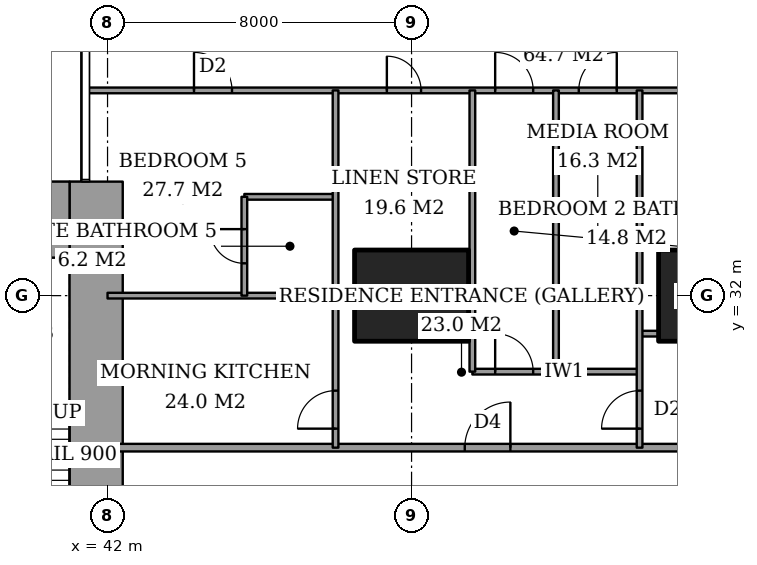
"""IFC4 building model, lengths in metres.
Left out: names, types, materials, properties, quantities, classifications, styles, units other than length and angle.
Written with IfcOpenShell. Run it as: python <this file> out.ifc"""

import sys

from ifc_helpers import new_model, si_unit, direction, frame, frame_2d, origin, origin_2d, place, context, subcontext, project, spatial, rectangle, extrude, element, fill, save


model = new_model("IFC4")
c1 = context("Model", 3, precision=1e-05, world=origin(), true_north=direction((0.0, 1.0)))
c2 = subcontext(c1, "Body", "Model", "MODEL_VIEW")
j1 = project(units=[si_unit("LENGTHUNIT", "METRE"), si_unit("PLANEANGLEUNIT", "RADIAN")], contexts=[c1])
p1 = place(None, origin())
s1 = spatial("IfcSite", under=j1, at=p1, CompositionType="ELEMENT")
p2 = place(p1, origin())
s2 = spatial("IfcBuilding", under=s1, at=p2, CompositionType="ELEMENT")
p3 = place(p2, frame((0.0, 0.0, 237.6)))
s3 = spatial("IfcBuildingStorey", under=s2, at=p3, CompositionType="ELEMENT", Elevation=237.6)
for number, where, z_axis, x_axis in (
    (1, (50.0, 32.0, 0.0), (0.0, 0.0, 1.0), (1.0, 0.0, 0.0)),
    (2, (58.0, 32.0, 0.0), (0.0, 0.0, 1.0), (1.0, 0.0, 0.0)),
):
    element("IfcColumn", number, at=place(p3, frame(where, z_axis=z_axis, x_axis=x_axis)), inside=s3, PredefinedType="COLUMN", context=c2, shape_type="SweptSolid", body=[
        extrude(rectangle(XDim=3.0, YDim=2.4, at=origin_2d()), origin(), (0.0, 0.0, 1.0), 3.6),
    ])
p4 = place(p3, frame((37.85, 34.0, 0.0), z_axis=(0.0, 0.0, 1.0), x_axis=(1.0, 0.0, 0.0)))
e3 = element("IfcWall", 3, at=p4, inside=s3, PredefinedType="SHEAR", context=c2, shape_type="SweptSolid", body=[
    extrude(rectangle(XDim=3.15, YDim=2.0, at=frame_2d((1.575, 0.0))), origin(), (0.0, 0.0, 1.0), 3.6),
])
p5 = place(p3, frame((41.7, 24.85, 0.0), z_axis=(0.0, 0.0, 1.0), x_axis=(0.0, 1.0, 0.0)))
e4 = element("IfcWall", 4, at=p5, inside=s3, PredefinedType="SHEAR", context=c2, shape_type="SweptSolid", body=[
    extrude(rectangle(XDim=10.15, YDim=1.4, at=frame_2d((5.075, 0.0))), origin(), (0.0, 0.0, 1.0), 3.6),
])
p6 = place(p3, frame((42.0, 28.0, 0.0), z_axis=(0.0, 0.0, 1.0), x_axis=(1.0, 0.0, 0.0)))
e5 = element("IfcWall", 5, at=p6, inside=s3, PredefinedType="PARTITIONING", context=c2, shape_type="SweptSolid", body=[
    extrude(rectangle(XDim=17.275, YDim=0.2, at=frame_2d((8.637, 0.0))), origin(), (0.0, 0.0, 1.0), 3.35),
])
p7 = place(p6, frame((9.4, 0.0, 0.0)))
e6 = element("IfcOpeningElement", 6, at=p7, cuts=e5, PredefinedType="OPENING", context=c2, shape_type="SweptSolid", body=[
    extrude(rectangle(XDim=1.2, YDim=2.4, at=frame_2d((0.6, 1.2))), frame((0.0, 0.11, 0.0), z_axis=(0.0, -1.0, 0.0), x_axis=(1.0, 0.0, 0.0)), (0.0, 0.0, 1.0), 0.22),
])
p8 = place(p3, frame((51.6, 30.0, 0.0), z_axis=(0.0, 0.0, 1.0), x_axis=(1.0, 0.0, 0.0)))
e7 = element("IfcWall", 7, at=p8, inside=s3, PredefinedType="PARTITIONING", context=c2, shape_type="SweptSolid", body=[
    extrude(rectangle(XDim=4.4, YDim=0.15, at=frame_2d((2.2, 0.0))), origin(), (0.0, 0.0, 1.0), 3.35),
])
p9 = place(p8, frame((0.6, 0.0, 0.0)))
e8 = element("IfcOpeningElement", 8, at=p9, cuts=e7, PredefinedType="OPENING", context=c2, shape_type="SweptSolid", body=[
    extrude(rectangle(XDim=1.0, YDim=2.1, at=frame_2d((0.5, 1.05))), frame((0.0, 0.085, 0.0), z_axis=(0.0, -1.0, 0.0), x_axis=(1.0, 0.0, 0.0)), (0.0, 0.0, 1.0), 0.17),
])
p10 = place(p3, frame((56.0, 31.0, 0.0), z_axis=(0.0, 0.0, 1.0), x_axis=(1.0, 0.0, 0.0)))
e9 = element("IfcWall", 9, at=p10, inside=s3, PredefinedType="PARTITIONING", context=c2, shape_type="SweptSolid", body=[
    extrude(rectangle(XDim=0.5, YDim=0.15, at=frame_2d((0.25, 0.0))), origin(), (0.0, 0.0, 1.0), 3.35),
])
p11 = place(p3, frame((48.0, 31.95, 0.0), z_axis=(0.0, 0.0, 1.0), x_axis=(1.0, 0.0, 0.0)))
e10 = element("IfcWall", 10, at=p11, inside=s3, PredefinedType="PARTITIONING", context=c2, shape_type="SweptSolid", body=[
    extrude(rectangle(XDim=0.5, YDim=0.15, at=frame_2d((0.25, 0.0))), origin(), (0.0, 0.0, 1.0), 2.634),
])
p12 = place(p3, frame((42.0, 32.0, 0.0), z_axis=(0.0, 0.0, 1.0), x_axis=(1.0, 0.0, 0.0)))
e11 = element("IfcWall", 11, at=p12, inside=s3, PredefinedType="PARTITIONING", context=c2, shape_type="SweptSolid", body=[
    extrude(rectangle(XDim=6.0, YDim=0.15, at=frame_2d((3.0, 0.0))), origin(), (0.0, 0.0, 1.0), 2.634),
])
p13 = place(p3, frame((45.6, 34.6, 0.0), z_axis=(0.0, 0.0, 1.0), x_axis=(1.0, 0.0, 0.0)))
e12 = element("IfcWall", 12, at=p13, inside=s3, PredefinedType="PARTITIONING", context=c2, shape_type="SweptSolid", body=[
    extrude(rectangle(XDim=2.4, YDim=0.15, at=frame_2d((1.2, 0.0))), origin(), (0.0, 0.0, 1.0), 3.35),
])
p14 = place(p3, frame((41.439, 37.4, 0.0), z_axis=(0.0, 0.0, 1.0), x_axis=(1.0, 0.0, 0.0)))
e13 = element("IfcWall", 13, at=p14, inside=s3, PredefinedType="PARTITIONING", context=c2, shape_type="SweptSolid", body=[
    extrude(rectangle(XDim=25.011, YDim=0.15, at=frame_2d((12.505, 0.0))), origin(), (0.0, 0.0, 1.0), 3.35),
])
p15 = place(p14, frame((10.761, 0.0, 0.0)))
e14 = element("IfcOpeningElement", 14, at=p15, cuts=e13, PredefinedType="OPENING", context=c2, shape_type="SweptSolid", body=[
    extrude(rectangle(XDim=1.0, YDim=2.1, at=frame_2d((0.5, 1.05))), frame((0.0, 0.085, 0.0), z_axis=(0.0, -1.0, 0.0), x_axis=(1.0, 0.0, 0.0)), (0.0, 0.0, 1.0), 0.17),
])
p16 = place(p14, frame((20.924, 0.0, 0.0)))
e15 = element("IfcOpeningElement", 15, at=p16, cuts=e13, PredefinedType="OPENING", context=c2, shape_type="SweptSolid", body=[
    extrude(rectangle(XDim=1.0, YDim=2.1, at=frame_2d((0.5, 1.05))), frame((0.0, 0.085, 0.0), z_axis=(0.0, -1.0, 0.0), x_axis=(1.0, 0.0, 0.0)), (0.0, 0.0, 1.0), 0.17),
])
p17 = place(p14, frame((15.749, 0.0, 0.0)))
e16 = element("IfcOpeningElement", 16, at=p17, cuts=e13, PredefinedType="OPENING", context=c2, shape_type="SweptSolid", body=[
    extrude(rectangle(XDim=0.9, YDim=2.1, at=frame_2d((0.45, 1.05))), frame((0.0, 0.085, 0.0), z_axis=(0.0, -1.0, 0.0), x_axis=(1.0, 0.0, 0.0)), (0.0, 0.0, 1.0), 0.17),
])
p18 = place(p14, frame((12.961, 0.0, 0.0)))
e17 = element("IfcOpeningElement", 17, at=p18, cuts=e13, PredefinedType="OPENING", context=c2, shape_type="SweptSolid", body=[
    extrude(rectangle(XDim=1.0, YDim=2.1, at=frame_2d((0.5, 1.05))), frame((0.0, 0.085, 0.0), z_axis=(0.0, -1.0, 0.0), x_axis=(1.0, 0.0, 0.0)), (0.0, 0.0, 1.0), 0.17),
])
p19 = place(p14, frame((7.911, 0.0, 0.0)))
e18 = element("IfcOpeningElement", 18, at=p19, cuts=e13, PredefinedType="OPENING", context=c2, shape_type="SweptSolid", body=[
    extrude(rectangle(XDim=0.9, YDim=2.1, at=frame_2d((0.45, 1.05))), frame((0.0, 0.085, 0.0), z_axis=(0.0, -1.0, 0.0), x_axis=(1.0, 0.0, 0.0)), (0.0, 0.0, 1.0), 0.17),
])
p20 = place(p14, frame((2.836, 0.0, 0.0)))
e19 = element("IfcOpeningElement", 19, at=p20, cuts=e13, PredefinedType="OPENING", context=c2, shape_type="SweptSolid", body=[
    extrude(rectangle(XDim=1.0, YDim=2.1, at=frame_2d((0.5, 1.05))), frame((0.0, 0.085, 0.0), z_axis=(0.0, -1.0, 0.0), x_axis=(1.0, 0.0, 0.0)), (0.0, 0.0, 1.0), 0.17),
])
p21 = place(p3, frame((45.6, 32.0, 0.0), z_axis=(0.0, 0.0, 1.0), x_axis=(0.0, 1.0, 0.0)))
e20 = element("IfcWall", 20, at=p21, inside=s3, PredefinedType="PARTITIONING", context=c2, shape_type="SweptSolid", body=[
    extrude(rectangle(XDim=2.6, YDim=0.15, at=frame_2d((1.3, 0.0))), origin(), (0.0, 0.0, 1.0), 3.35),
])
p22 = place(p21, frame((0.85, 0.0, 0.0)))
e21 = element("IfcOpeningElement", 21, at=p22, cuts=e20, PredefinedType="OPENING", context=c2, shape_type="SweptSolid", body=[
    extrude(rectangle(XDim=0.9, YDim=2.1, at=frame_2d((0.45, 1.05))), frame((0.0, 0.085, 0.0), z_axis=(0.0, -1.0, 0.0), x_axis=(1.0, 0.0, 0.0)), (0.0, 0.0, 1.0), 0.17),
])
p23 = place(p3, frame((48.0, 28.0, 0.0), z_axis=(0.0, 0.0, 1.0), x_axis=(0.0, 1.0, 0.0)))
e22 = element("IfcWall", 22, at=p23, inside=s3, PredefinedType="PARTITIONING", context=c2, shape_type="SweptSolid", body=[
    extrude(rectangle(XDim=9.4, YDim=0.15, at=frame_2d((4.7, 0.0))), origin(), (0.0, 0.0, 1.0), 3.35),
])
p24 = place(p23, frame((0.5, 0.0, 0.0)))
e23 = element("IfcOpeningElement", 23, at=p24, cuts=e22, PredefinedType="OPENING", context=c2, shape_type="SweptSolid", body=[
    extrude(rectangle(XDim=1.0, YDim=2.1, at=frame_2d((0.5, 1.05))), frame((0.0, 0.085, 0.0), z_axis=(0.0, -1.0, 0.0), x_axis=(1.0, 0.0, 0.0)), (0.0, 0.0, 1.0), 0.17),
])
for number, where, z_axis, x_axis in (
    (24, (51.6, 30.0, 0.0), (0.0, 0.0, 1.0), (0.0, 1.0, 0.0)),
    (25, (53.8, 30.0, 0.0), (0.0, 0.0, 1.0), (0.0, 1.0, 0.0)),
):
    element("IfcWall", number, at=place(p3, frame(where, z_axis=z_axis, x_axis=x_axis)), inside=s3, PredefinedType="PARTITIONING", context=c2, shape_type="SweptSolid", body=[
        extrude(rectangle(XDim=7.4, YDim=0.15, at=frame_2d((3.7, 0.0))), origin(), (0.0, 0.0, 1.0), 3.35),
    ])
p25 = place(p3, frame((56.0, 28.0, 0.0), z_axis=(0.0, 0.0, 1.0), x_axis=(0.0, 1.0, 0.0)))
e26 = element("IfcWall", 26, at=p25, inside=s3, PredefinedType="PARTITIONING", context=c2, shape_type="SweptSolid", body=[
    extrude(rectangle(XDim=9.4, YDim=0.15, at=frame_2d((4.7, 0.0))), origin(), (0.0, 0.0, 1.0), 3.35),
])
p26 = place(p25, frame((0.5, 0.0, 0.0)))
e27 = element("IfcOpeningElement", 27, at=p26, cuts=e26, PredefinedType="OPENING", context=c2, shape_type="SweptSolid", body=[
    extrude(rectangle(XDim=1.0, YDim=2.1, at=frame_2d((0.5, 1.05))), frame((0.0, 0.085, 0.0), z_axis=(0.0, -1.0, 0.0), x_axis=(1.0, 0.0, 0.0)), (0.0, 0.0, 1.0), 0.17),
])
p27 = place(p15, origin())
e28 = element("IfcDoor", 28, at=p27, inside=s3, OperationType="SINGLE_SWING_RIGHT", PredefinedType="DOOR", context=c2, shape_type="SweptSolid", body=[
    extrude(rectangle(XDim=1.0, YDim=2.1, at=frame_2d((0.5, 1.05))), frame((0.0, 0.025, 0.0), z_axis=(0.0, -1.0, 0.0), x_axis=(1.0, 0.0, 0.0)), (0.0, 0.0, 1.0), 0.05),
])
fill(e14, e28)
p28 = place(p26, origin())
e29 = element("IfcDoor", 29, at=p28, inside=s3, OperationType="SINGLE_SWING_RIGHT", PredefinedType="DOOR", context=c2, shape_type="SweptSolid", body=[
    extrude(rectangle(XDim=1.0, YDim=2.1, at=frame_2d((0.5, 1.05))), frame((0.0, 0.025, 0.0), z_axis=(0.0, -1.0, 0.0), x_axis=(1.0, 0.0, 0.0)), (0.0, 0.0, 1.0), 0.05),
])
fill(e27, e29)
p29 = place(p7, origin())
e30 = element("IfcDoor", 30, at=p29, inside=s3, OperationType="SINGLE_SWING_LEFT", PredefinedType="DOOR", context=c2, shape_type="SweptSolid", body=[
    extrude(rectangle(XDim=1.2, YDim=2.4, at=frame_2d((0.6, 1.2))), frame((0.0, 0.025, 0.0), z_axis=(0.0, -1.0, 0.0), x_axis=(1.0, 0.0, 0.0)), (0.0, 0.0, 1.0), 0.05),
])
fill(e6, e30)
p30 = place(p18, origin())
e31 = element("IfcDoor", 31, at=p30, inside=s3, OperationType="SINGLE_SWING_LEFT", PredefinedType="DOOR", context=c2, shape_type="SweptSolid", body=[
    extrude(rectangle(XDim=1.0, YDim=2.1, at=frame_2d((0.5, 1.05))), frame((0.0, 0.025, 0.0), z_axis=(0.0, -1.0, 0.0), x_axis=(1.0, 0.0, 0.0)), (0.0, 0.0, 1.0), 0.05),
])
fill(e17, e31)
p31 = place(p9, origin())
e32 = element("IfcDoor", 32, at=p31, inside=s3, OperationType="SINGLE_SWING_RIGHT", PredefinedType="DOOR", context=c2, shape_type="SweptSolid", body=[
    extrude(rectangle(XDim=1.0, YDim=2.1, at=frame_2d((0.5, 1.05))), frame((0.0, 0.025, 0.0), z_axis=(0.0, -1.0, 0.0), x_axis=(1.0, 0.0, 0.0)), (0.0, 0.0, 1.0), 0.05),
])
fill(e8, e32)
p32 = place(p19, origin())
e33 = element("IfcDoor", 33, at=p32, inside=s3, OperationType="SINGLE_SWING_RIGHT", PredefinedType="DOOR", context=c2, shape_type="SweptSolid", body=[
    extrude(rectangle(XDim=0.9, YDim=2.1, at=frame_2d((0.45, 1.05))), frame((0.0, 0.025, 0.0), z_axis=(0.0, -1.0, 0.0), x_axis=(1.0, 0.0, 0.0)), (0.0, 0.0, 1.0), 0.05),
])
fill(e18, e33)
p33 = place(p22, origin())
e34 = element("IfcDoor", 34, at=p33, inside=s3, OperationType="SINGLE_SWING_LEFT", PredefinedType="DOOR", context=c2, shape_type="SweptSolid", body=[
    extrude(rectangle(XDim=0.9, YDim=2.1, at=frame_2d((0.45, 1.05))), frame((0.0, 0.025, 0.0), z_axis=(0.0, -1.0, 0.0), x_axis=(1.0, 0.0, 0.0)), (0.0, 0.0, 1.0), 0.05),
])
fill(e21, e34)
p34 = place(p20, origin())
e35 = element("IfcDoor", 35, at=p34, inside=s3, OperationType="SINGLE_SWING_RIGHT", PredefinedType="DOOR", context=c2, shape_type="SweptSolid", body=[
    extrude(rectangle(XDim=1.0, YDim=2.1, at=frame_2d((0.5, 1.05))), frame((0.0, 0.025, 0.0), z_axis=(0.0, -1.0, 0.0), x_axis=(1.0, 0.0, 0.0)), (0.0, 0.0, 1.0), 0.05),
])
fill(e19, e35)
p35 = place(p24, origin())
e36 = element("IfcDoor", 36, at=p35, inside=s3, OperationType="SINGLE_SWING_RIGHT", PredefinedType="DOOR", context=c2, shape_type="SweptSolid", body=[
    extrude(rectangle(XDim=1.0, YDim=2.1, at=frame_2d((0.5, 1.05))), frame((0.0, 0.025, 0.0), z_axis=(0.0, -1.0, 0.0), x_axis=(1.0, 0.0, 0.0)), (0.0, 0.0, 1.0), 0.05),
])
fill(e23, e36)
save(model, sys.argv[1])
